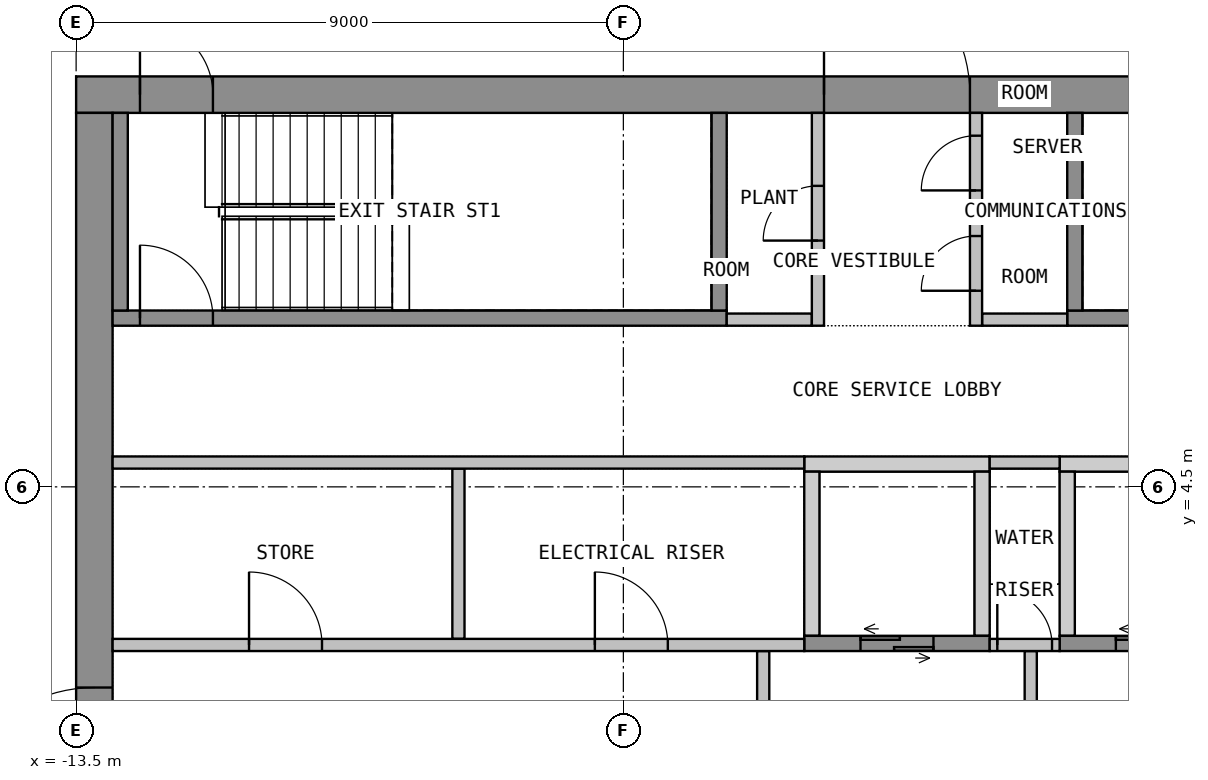
"""IFC4 building model, lengths in metres.
Left out: names, types, materials, properties, quantities, classifications, styles, units other than length and angle.
Written with IfcOpenShell. Run it as: python <this file> out.ifc"""

import sys

from ifc_helpers import new_model, si_unit, direction, frame, frame_2d, origin, place, context, subcontext, project, spatial, polyline, rectangle, outline, extrude, element, fill, save


model = new_model("IFC4")
c1 = context("Model", 3, precision=1e-05, world=origin(), true_north=direction((0.0, 1.0)))
c2 = subcontext(c1, "Body", "Model", "MODEL_VIEW")
j1 = project(units=[si_unit("LENGTHUNIT", "METRE"), si_unit("PLANEANGLEUNIT", "RADIAN")], contexts=[c1])
p1 = place(None, origin())
s1 = spatial("IfcSite", under=j1, at=p1, CompositionType="ELEMENT")
p2 = place(p1, origin())
s2 = spatial("IfcBuilding", under=s1, at=p2, CompositionType="ELEMENT")
p3 = place(p2, frame((0.0, 0.0, 286.5)))
s3 = spatial("IfcBuildingStorey", under=s2, at=p3, CompositionType="ELEMENT", Elevation=286.5)
p4 = place(p3, frame((-13.5, 10.95, 0.0), z_axis=(0.0, 0.0, 1.0), x_axis=(1.0, 0.0, 0.0)))
e1 = element("IfcWall", 1, at=p4, inside=s3, PredefinedType="SHEAR", context=c2, shape_type="SweptSolid", body=[
    extrude(rectangle(XDim=27.0, YDim=0.6, at=frame_2d((13.5, 0.0))), origin(), (0.0, 0.0, 1.0), 3.575),
])
p5 = place(p4, frame((12.3, 0.0, 0.0)))
e2 = element("IfcOpeningElement", 2, at=p5, cuts=e1, PredefinedType="OPENING", context=c2, shape_type="SweptSolid", body=[
    extrude(rectangle(XDim=2.4, YDim=2.1, at=frame_2d((1.2, 1.05))), frame((0.0, 0.31, 0.0), z_axis=(0.0, -1.0, 0.0), x_axis=(1.0, 0.0, 0.0)), (0.0, 0.0, 1.0), 0.62),
])
p6 = place(p4, frame((1.05, 0.0, 0.0)))
e3 = element("IfcOpeningElement", 3, at=p6, cuts=e1, PredefinedType="OPENING", context=c2, shape_type="SweptSolid", body=[
    extrude(rectangle(XDim=1.2, YDim=2.1, at=frame_2d((0.6, 1.05))), frame((0.0, 0.31, 0.0), z_axis=(0.0, -1.0, 0.0), x_axis=(1.0, 0.0, 0.0)), (0.0, 0.0, 1.0), 0.62),
])
p7 = place(p4, frame((24.75, 0.0, 0.0)))
e4 = element("IfcOpeningElement", 4, at=p7, cuts=e1, PredefinedType="OPENING", context=c2, shape_type="SweptSolid", body=[
    extrude(rectangle(XDim=1.2, YDim=2.1, at=frame_2d((0.6, 1.05))), frame((0.0, 0.31, 0.0), z_axis=(0.0, -1.0, 0.0), x_axis=(1.0, 0.0, 0.0)), (0.0, 0.0, 1.0), 0.62),
])
p8 = place(p3, frame((-13.2, -10.65, 0.0), z_axis=(0.0, 0.0, 1.0), x_axis=(0.0, 1.0, 0.0)))
e5 = element("IfcWall", 5, at=p8, inside=s3, PredefinedType="SHEAR", context=c2, shape_type="SweptSolid", body=[
    extrude(rectangle(XDim=21.3, YDim=0.6, at=frame_2d((10.65, 0.0))), origin(), (0.0, 0.0, 1.0), 3.575),
])
p9 = place(p8, frame((9.45, 0.0, 0.0)))
e6 = element("IfcOpeningElement", 6, at=p9, cuts=e5, PredefinedType="OPENING", context=c2, shape_type="SweptSolid", body=[
    extrude(rectangle(XDim=2.4, YDim=2.1, at=frame_2d((1.2, 1.05))), frame((0.0, 0.31, 0.0), z_axis=(0.0, -1.0, 0.0), x_axis=(1.0, 0.0, 0.0)), (0.0, 0.0, 1.0), 0.62),
])
p10 = place(p3, origin())
e7 = element("IfcWall", 7, at=p10, inside=s3, PredefinedType="SHEAR", context=c2, shape_type="SweptSolid", body=[
    extrude(outline(polyline([(-1.525, 4.75), (1.525, 4.75), (1.525, 5.0), (-1.525, 5.0), (-1.525, 4.75)])), origin(), (0.0, 0.0, 1.0), 3.575),
])
p11 = place(p3, origin())
e8 = element("IfcWall", 8, at=p11, inside=s3, PredefinedType="SHEAR", context=c2, shape_type="SweptSolid", body=[
    extrude(outline(polyline([(2.675, 4.75), (8.525, 4.75), (8.525, 5.0), (2.675, 5.0), (2.675, 4.75)])), origin(), (0.0, 0.0, 1.0), 3.575),
])
p12 = place(p3, origin())
e9 = element("IfcWall", 9, at=p12, inside=s3, PredefinedType="SHEAR", context=c2, shape_type="SweptSolid", body=[
    extrude(outline(polyline([(-1.525, 2.05), (-1.275, 2.05), (-1.275, 4.75), (-1.525, 4.75), (-1.525, 2.05)])), origin(), (0.0, 0.0, 1.0), 3.575),
])
p13 = place(p3, origin())
e10 = element("IfcWall", 10, at=p13, inside=s3, PredefinedType="SHEAR", context=c2, shape_type="SweptSolid", body=[
    extrude(outline(polyline([(1.275, 2.05), (1.525, 2.05), (1.525, 4.75), (1.275, 4.75), (1.275, 2.05)])), origin(), (0.0, 0.0, 1.0), 3.575),
])
p14 = place(p3, origin())
e11 = element("IfcWall", 11, at=p14, inside=s3, PredefinedType="SHEAR", context=c2, shape_type="SweptSolid", body=[
    extrude(outline(polyline([(2.675, 2.05), (2.925, 2.05), (2.925, 4.75), (2.675, 4.75), (2.675, 2.05)])), origin(), (0.0, 0.0, 1.0), 3.575),
])
p15 = place(p3, frame((-1.525, 1.925, 0.0), z_axis=(0.0, 0.0, 1.0), x_axis=(1.0, 0.0, 0.0)))
e12 = element("IfcWall", 12, at=p15, inside=s3, PredefinedType="SHEAR", context=c2, shape_type="SweptSolid", body=[
    extrude(rectangle(XDim=3.05, YDim=0.25, at=frame_2d((1.525, 0.0))), origin(), (0.0, 0.0, 1.0), 3.575),
])
p16 = place(p15, frame((0.925, 0.0, 0.0)))
e13 = element("IfcOpeningElement", 13, at=p16, cuts=e12, PredefinedType="OPENING", context=c2, shape_type="SweptSolid", body=[
    extrude(rectangle(XDim=1.2, YDim=2.1, at=frame_2d((0.6, 1.05))), frame((0.0, 0.135, 0.0), z_axis=(0.0, -1.0, 0.0), x_axis=(1.0, 0.0, 0.0)), (0.0, 0.0, 1.0), 0.27),
])
p17 = place(p3, frame((2.675, 1.925, 0.0), z_axis=(0.0, 0.0, 1.0), x_axis=(1.0, 0.0, 0.0)))
e14 = element("IfcWall", 14, at=p17, inside=s3, PredefinedType="SHEAR", context=c2, shape_type="SweptSolid", body=[
    extrude(rectangle(XDim=5.85, YDim=0.25, at=frame_2d((2.925, 0.0))), origin(), (0.0, 0.0, 1.0), 3.575),
])
p18 = place(p17, frame((0.925, 0.0, 0.0)))
e15 = element("IfcOpeningElement", 15, at=p18, cuts=e14, PredefinedType="OPENING", context=c2, shape_type="SweptSolid", body=[
    extrude(rectangle(XDim=1.2, YDim=2.1, at=frame_2d((0.6, 1.05))), frame((0.0, 0.135, 0.0), z_axis=(0.0, -1.0, 0.0), x_axis=(1.0, 0.0, 0.0)), (0.0, 0.0, 1.0), 0.27),
])
p19 = place(p17, frame((3.725, 0.0, 0.0)))
e16 = element("IfcOpeningElement", 16, at=p19, cuts=e14, PredefinedType="OPENING", context=c2, shape_type="SweptSolid", body=[
    extrude(rectangle(XDim=1.2, YDim=2.1, at=frame_2d((0.6, 1.05))), frame((0.0, 0.135, 0.0), z_axis=(0.0, -1.0, 0.0), x_axis=(1.0, 0.0, 0.0)), (0.0, 0.0, 1.0), 0.27),
])
p20 = place(p3, frame((-2.2, -1.8, 0.0), z_axis=(0.0, 0.0, 1.0), x_axis=(0.0, 1.0, 0.0)))
e17 = element("IfcWall", 17, at=p20, inside=s3, PredefinedType="PARTITIONING", context=c2, shape_type="SweptSolid", body=[
    extrude(rectangle(XDim=3.6, YDim=0.2, at=frame_2d((1.8, 0.0))), origin(), (0.0, 0.0, 1.0), 3.575),
])
p21 = place(p20, frame((1.2, 0.0, 0.0)))
e18 = element("IfcOpeningElement", 18, at=p21, cuts=e17, PredefinedType="OPENING", context=c2, shape_type="SweptSolid", body=[
    extrude(rectangle(XDim=1.2, YDim=2.1, at=frame_2d((0.6, 1.05))), frame((0.0, 0.11, 0.0), z_axis=(0.0, -1.0, 0.0), x_axis=(1.0, 0.0, 0.0)), (0.0, 0.0, 1.0), 0.22),
])
p22 = place(p3, frame((2.2, -1.8, 0.0), z_axis=(0.0, 0.0, 1.0), x_axis=(0.0, 1.0, 0.0)))
e19 = element("IfcWall", 19, at=p22, inside=s3, PredefinedType="PARTITIONING", context=c2, shape_type="SweptSolid", body=[
    extrude(rectangle(XDim=3.6, YDim=0.2, at=frame_2d((1.8, 0.0))), origin(), (0.0, 0.0, 1.0), 3.575),
])
p23 = place(p22, frame((1.2, 0.0, 0.0)))
e20 = element("IfcOpeningElement", 20, at=p23, cuts=e19, PredefinedType="OPENING", context=c2, shape_type="SweptSolid", body=[
    extrude(rectangle(XDim=1.2, YDim=2.1, at=frame_2d((0.6, 1.05))), frame((0.0, 0.11, 0.0), z_axis=(0.0, -1.0, 0.0), x_axis=(1.0, 0.0, 0.0)), (0.0, 0.0, 1.0), 0.22),
])
p24 = place(p3, frame((-12.9, 7.275, 0.0), z_axis=(0.0, 0.0, 1.0), x_axis=(1.0, 0.0, 0.0)))
e21 = element("IfcWall", 21, at=p24, inside=s3, PredefinedType="SHEAR", context=c2, shape_type="SweptSolid", body=[
    extrude(rectangle(XDim=10.1, YDim=0.25, at=frame_2d((5.05, 0.0))), origin(), (0.0, 0.0, 1.0), 3.575),
])
p25 = place(p24, frame((0.45, 0.0, 0.0)))
e22 = element("IfcOpeningElement", 22, at=p25, cuts=e21, PredefinedType="OPENING", context=c2, shape_type="SweptSolid", body=[
    extrude(rectangle(XDim=1.2, YDim=2.1, at=frame_2d((0.6, 1.05))), frame((0.0, 0.135, 0.0), z_axis=(0.0, -1.0, 0.0), x_axis=(1.0, 0.0, 0.0)), (0.0, 0.0, 1.0), 0.27),
])
for number, where, z_axis, x_axis in (
    (23, (-12.775, 7.4, 0.0), (0.0, 0.0, 1.0), (0.0, 1.0, 0.0)),
    (24, (-2.925, 7.4, 0.0), (0.0, 0.0, 1.0), (0.0, 1.0, 0.0)),
):
    element("IfcWall", number, at=place(p3, frame(where, z_axis=z_axis, x_axis=x_axis)), inside=s3, PredefinedType="SHEAR", context=c2, shape_type="SweptSolid", body=[
        extrude(rectangle(XDim=3.25, YDim=0.25, at=frame_2d((1.625, 0.0))), origin(), (0.0, 0.0, 1.0), 3.575),
    ])
p26 = place(p3, frame((2.8, 7.275, 0.0), z_axis=(0.0, 0.0, 1.0), x_axis=(1.0, 0.0, 0.0)))
e25 = element("IfcWall", 25, at=p26, inside=s3, PredefinedType="SHEAR", context=c2, shape_type="SweptSolid", body=[
    extrude(rectangle(XDim=10.1, YDim=0.25, at=frame_2d((5.05, 0.0))), origin(), (0.0, 0.0, 1.0), 3.575),
])
p27 = place(p26, frame((8.45, 0.0, 0.0)))
e26 = element("IfcOpeningElement", 26, at=p27, cuts=e25, PredefinedType="OPENING", context=c2, shape_type="SweptSolid", body=[
    extrude(rectangle(XDim=1.2, YDim=2.1, at=frame_2d((0.6, 1.05))), frame((0.0, 0.135, 0.0), z_axis=(0.0, -1.0, 0.0), x_axis=(1.0, 0.0, 0.0)), (0.0, 0.0, 1.0), 0.27),
])
p28 = place(p3, frame((2.925, 7.4, 0.0), z_axis=(0.0, 0.0, 1.0), x_axis=(0.0, 1.0, 0.0)))
e27 = element("IfcWall", 27, at=p28, inside=s3, PredefinedType="SHEAR", context=c2, shape_type="SweptSolid", body=[
    extrude(rectangle(XDim=3.25, YDim=0.25, at=frame_2d((1.625, 0.0))), origin(), (0.0, 0.0, 1.0), 3.575),
])
for number, where, z_axis, x_axis in (
    (28, (-2.8, 7.25, 0.0), (0.0, 0.0, 1.0), (1.0, 0.0, 0.0)),
    (29, (1.4, 7.25, 0.0), (0.0, 0.0, 1.0), (1.0, 0.0, 0.0)),
    (30, (1.4, 9.0, 0.0), (0.0, 0.0, 1.0), (1.0, 0.0, 0.0)),
):
    element("IfcWall", number, at=place(p3, frame(where, z_axis=z_axis, x_axis=x_axis)), inside=s3, PredefinedType="PARTITIONING", context=c2, shape_type="SweptSolid", body=[
        extrude(rectangle(XDim=1.4, YDim=0.2, at=frame_2d((0.7, 0.0))), origin(), (0.0, 0.0, 1.0), 3.575),
    ])
p29 = place(p3, frame((-1.3, 7.15, 0.0), z_axis=(0.0, 0.0, 1.0), x_axis=(0.0, 1.0, 0.0)))
e31 = element("IfcWall", 31, at=p29, inside=s3, PredefinedType="PARTITIONING", context=c2, shape_type="SweptSolid", body=[
    extrude(rectangle(XDim=3.5, YDim=0.2, at=frame_2d((1.75, 0.0))), origin(), (0.0, 0.0, 1.0), 3.575),
])
p30 = place(p29, frame((1.4, 0.0, 0.0)))
e32 = element("IfcOpeningElement", 32, at=p30, cuts=e31, PredefinedType="OPENING", context=c2, shape_type="SweptSolid", body=[
    extrude(rectangle(XDim=0.9, YDim=2.1, at=frame_2d((0.45, 1.05))), frame((0.0, 0.11, 0.0), z_axis=(0.0, -1.0, 0.0), x_axis=(1.0, 0.0, 0.0)), (0.0, 0.0, 1.0), 0.22),
])
p31 = place(p3, frame((1.3, 7.15, 0.0), z_axis=(0.0, 0.0, 1.0), x_axis=(0.0, 1.0, 0.0)))
e33 = element("IfcWall", 33, at=p31, inside=s3, PredefinedType="PARTITIONING", context=c2, shape_type="SweptSolid", body=[
    extrude(rectangle(XDim=3.5, YDim=0.2, at=frame_2d((1.75, 0.0))), origin(), (0.0, 0.0, 1.0), 3.575),
])
p32 = place(p31, frame((0.575, 0.0, 0.0)))
e34 = element("IfcOpeningElement", 34, at=p32, cuts=e33, PredefinedType="OPENING", context=c2, shape_type="SweptSolid", body=[
    extrude(rectangle(XDim=0.9, YDim=2.1, at=frame_2d((0.45, 1.05))), frame((0.0, 0.11, 0.0), z_axis=(0.0, -1.0, 0.0), x_axis=(1.0, 0.0, 0.0)), (0.0, 0.0, 1.0), 0.22),
])
p33 = place(p31, frame((2.225, 0.0, 0.0)))
e35 = element("IfcOpeningElement", 35, at=p33, cuts=e33, PredefinedType="OPENING", context=c2, shape_type="SweptSolid", body=[
    extrude(rectangle(XDim=0.9, YDim=2.1, at=frame_2d((0.45, 1.05))), frame((0.0, 0.11, 0.0), z_axis=(0.0, -1.0, 0.0), x_axis=(1.0, 0.0, 0.0)), (0.0, 0.0, 1.0), 0.22),
])
p34 = place(p3, frame((-7.212, 2.0, 0.0), z_axis=(0.0, 0.0, 1.0), x_axis=(0.0, 1.0, 0.0)))
e36 = element("IfcWall", 36, at=p34, inside=s3, PredefinedType="PARTITIONING", context=c2, shape_type="SweptSolid", body=[
    extrude(rectangle(XDim=2.8, YDim=0.2, at=frame_2d((1.4, 0.0))), origin(), (0.0, 0.0, 1.0), 3.575),
])
p35 = place(p3, frame((-12.9, 1.9, 0.0), z_axis=(0.0, 0.0, 1.0), x_axis=(1.0, 0.0, 0.0)))
e37 = element("IfcWall", 37, at=p35, inside=s3, PredefinedType="PARTITIONING", context=c2, shape_type="SweptSolid", body=[
    extrude(rectangle(XDim=11.375, YDim=0.2, at=frame_2d((5.688, 0.0))), origin(), (0.0, 0.0, 1.0), 3.575),
])
p36 = place(p35, frame((2.244, 0.0, 0.0)))
e38 = element("IfcOpeningElement", 38, at=p36, cuts=e37, PredefinedType="OPENING", context=c2, shape_type="SweptSolid", body=[
    extrude(rectangle(XDim=1.2, YDim=2.1, at=frame_2d((0.6, 1.05))), frame((0.0, 0.11, 0.0), z_axis=(0.0, -1.0, 0.0), x_axis=(1.0, 0.0, 0.0)), (0.0, 0.0, 1.0), 0.22),
])
p37 = place(p35, frame((7.931, 0.0, 0.0)))
e39 = element("IfcOpeningElement", 39, at=p37, cuts=e37, PredefinedType="OPENING", context=c2, shape_type="SweptSolid", body=[
    extrude(rectangle(XDim=1.2, YDim=2.1, at=frame_2d((0.6, 1.05))), frame((0.0, 0.11, 0.0), z_axis=(0.0, -1.0, 0.0), x_axis=(1.0, 0.0, 0.0)), (0.0, 0.0, 1.0), 0.22),
])
p38 = place(p3, frame((-12.9, 4.9, 0.0), z_axis=(0.0, 0.0, 1.0), x_axis=(1.0, 0.0, 0.0)))
e40 = element("IfcWall", 40, at=p38, inside=s3, PredefinedType="PARTITIONING", context=c2, shape_type="SweptSolid", body=[
    extrude(rectangle(XDim=11.375, YDim=0.2, at=frame_2d((5.688, 0.0))), origin(), (0.0, 0.0, 1.0), 3.575),
])
p39 = place(p3, frame((1.525, 1.9, 0.0), z_axis=(0.0, 0.0, 1.0), x_axis=(1.0, 0.0, 0.0)))
e41 = element("IfcWall", 41, at=p39, inside=s3, PredefinedType="PARTITIONING", context=c2, shape_type="SweptSolid", body=[
    extrude(rectangle(XDim=1.15, YDim=0.2, at=frame_2d((0.575, 0.0))), origin(), (0.0, 0.0, 1.0), 3.575),
])
p40 = place(p39, frame((0.125, 0.0, 0.0)))
e42 = element("IfcOpeningElement", 42, at=p40, cuts=e41, PredefinedType="OPENING", context=c2, shape_type="SweptSolid", body=[
    extrude(rectangle(XDim=0.9, YDim=2.1, at=frame_2d((0.45, 1.05))), frame((0.0, 0.11, 0.0), z_axis=(0.0, -1.0, 0.0), x_axis=(1.0, 0.0, 0.0)), (0.0, 0.0, 1.0), 0.22),
])
p41 = place(p3, frame((1.525, 4.9, 0.0), z_axis=(0.0, 0.0, 1.0), x_axis=(1.0, 0.0, 0.0)))
e43 = element("IfcWall", 43, at=p41, inside=s3, PredefinedType="PARTITIONING", context=c2, shape_type="SweptSolid", body=[
    extrude(rectangle(XDim=1.15, YDim=0.2, at=frame_2d((0.575, 0.0))), origin(), (0.0, 0.0, 1.0), 3.575),
])
p42 = place(p9, origin())
e44 = element("IfcDoor", 44, at=p42, inside=s3, OperationType="DOUBLE_DOOR_DOUBLE_SWING", PredefinedType="DOOR", context=c2, shape_type="SweptSolid", body=[
    extrude(rectangle(XDim=2.4, YDim=2.1, at=frame_2d((1.2, 1.05))), frame((0.0, 0.025, 0.0), z_axis=(0.0, -1.0, 0.0), x_axis=(1.0, 0.0, 0.0)), (0.0, 0.0, 1.0), 0.05),
])
fill(e6, e44)
p43 = place(p5, origin())
e45 = element("IfcDoor", 45, at=p43, inside=s3, OperationType="DOUBLE_DOOR_DOUBLE_SWING", PredefinedType="DOOR", context=c2, shape_type="SweptSolid", body=[
    extrude(rectangle(XDim=2.4, YDim=2.1, at=frame_2d((1.2, 1.05))), frame((0.0, 0.025, 0.0), z_axis=(0.0, -1.0, 0.0), x_axis=(1.0, 0.0, 0.0)), (0.0, 0.0, 1.0), 0.05),
])
fill(e2, e45)
p44 = place(p6, origin())
e46 = element("IfcDoor", 46, at=p44, inside=s3, OperationType="SINGLE_SWING_RIGHT", PredefinedType="DOOR", context=c2, shape_type="SweptSolid", body=[
    extrude(rectangle(XDim=1.2, YDim=2.1, at=frame_2d((0.6, 1.05))), frame((0.0, 0.025, 0.0), z_axis=(0.0, -1.0, 0.0), x_axis=(1.0, 0.0, 0.0)), (0.0, 0.0, 1.0), 0.05),
])
fill(e3, e46)
p45 = place(p16, origin())
e47 = element("IfcDoor", 47, at=p45, inside=s3, OperationType="DOUBLE_DOOR_SLIDING", PredefinedType="DOOR", context=c2, shape_type="SweptSolid", body=[
    extrude(rectangle(XDim=1.2, YDim=2.1, at=frame_2d((0.6, 1.05))), frame((0.0, 0.025, 0.0), z_axis=(0.0, -1.0, 0.0), x_axis=(1.0, 0.0, 0.0)), (0.0, 0.0, 1.0), 0.05),
])
fill(e13, e47)
p46 = place(p18, origin())
e48 = element("IfcDoor", 48, at=p46, inside=s3, OperationType="DOUBLE_DOOR_SLIDING", PredefinedType="DOOR", context=c2, shape_type="SweptSolid", body=[
    extrude(rectangle(XDim=1.2, YDim=2.1, at=frame_2d((0.6, 1.05))), frame((0.0, 0.025, 0.0), z_axis=(0.0, -1.0, 0.0), x_axis=(1.0, 0.0, 0.0)), (0.0, 0.0, 1.0), 0.05),
])
fill(e15, e48)
p47 = place(p25, origin())
e49 = element("IfcDoor", 49, at=p47, inside=s3, OperationType="SINGLE_SWING_LEFT", PredefinedType="DOOR", context=c2, shape_type="SweptSolid", body=[
    extrude(rectangle(XDim=1.2, YDim=2.1, at=frame_2d((0.6, 1.05))), frame((0.0, 0.025, 0.0), z_axis=(0.0, -1.0, 0.0), x_axis=(1.0, 0.0, 0.0)), (0.0, 0.0, 1.0), 0.05),
])
fill(e22, e49)
p48 = place(p30, origin())
e50 = element("IfcDoor", 50, at=p48, inside=s3, OperationType="SINGLE_SWING_LEFT", PredefinedType="DOOR", context=c2, shape_type="SweptSolid", body=[
    extrude(rectangle(XDim=0.9, YDim=2.1, at=frame_2d((0.45, 1.05))), frame((0.0, 0.025, 0.0), z_axis=(0.0, -1.0, 0.0), x_axis=(1.0, 0.0, 0.0)), (0.0, 0.0, 1.0), 0.05),
])
fill(e32, e50)
p49 = place(p32, origin())
e51 = element("IfcDoor", 51, at=p49, inside=s3, OperationType="SINGLE_SWING_LEFT", PredefinedType="DOOR", context=c2, shape_type="SweptSolid", body=[
    extrude(rectangle(XDim=0.9, YDim=2.1, at=frame_2d((0.45, 1.05))), frame((0.0, 0.025, 0.0), z_axis=(0.0, -1.0, 0.0), x_axis=(1.0, 0.0, 0.0)), (0.0, 0.0, 1.0), 0.05),
])
fill(e34, e51)
p50 = place(p33, origin())
e52 = element("IfcDoor", 52, at=p50, inside=s3, OperationType="SINGLE_SWING_LEFT", PredefinedType="DOOR", context=c2, shape_type="SweptSolid", body=[
    extrude(rectangle(XDim=0.9, YDim=2.1, at=frame_2d((0.45, 1.05))), frame((0.0, 0.025, 0.0), z_axis=(0.0, -1.0, 0.0), x_axis=(1.0, 0.0, 0.0)), (0.0, 0.0, 1.0), 0.05),
])
fill(e35, e52)
p51 = place(p36, origin())
e53 = element("IfcDoor", 53, at=p51, inside=s3, OperationType="SINGLE_SWING_RIGHT", PredefinedType="DOOR", context=c2, shape_type="SweptSolid", body=[
    extrude(rectangle(XDim=1.2, YDim=2.1, at=frame_2d((0.6, 1.05))), frame((0.0, 0.025, 0.0), z_axis=(0.0, -1.0, 0.0), x_axis=(1.0, 0.0, 0.0)), (0.0, 0.0, 1.0), 0.05),
])
fill(e38, e53)
p52 = place(p37, origin())
e54 = element("IfcDoor", 54, at=p52, inside=s3, OperationType="SINGLE_SWING_RIGHT", PredefinedType="DOOR", context=c2, shape_type="SweptSolid", body=[
    extrude(rectangle(XDim=1.2, YDim=2.1, at=frame_2d((0.6, 1.05))), frame((0.0, 0.025, 0.0), z_axis=(0.0, -1.0, 0.0), x_axis=(1.0, 0.0, 0.0)), (0.0, 0.0, 1.0), 0.05),
])
fill(e39, e54)
p53 = place(p40, origin())
e55 = element("IfcDoor", 55, at=p53, inside=s3, OperationType="SINGLE_SWING_LEFT", PredefinedType="DOOR", context=c2, shape_type="SweptSolid", body=[
    extrude(rectangle(XDim=0.9, YDim=2.1, at=frame_2d((0.45, 1.05))), frame((0.0, 0.025, 0.0), z_axis=(0.0, -1.0, 0.0), x_axis=(1.0, 0.0, 0.0)), (0.0, 0.0, 1.0), 0.05),
])
fill(e42, e55)
save(model, sys.argv[1])
